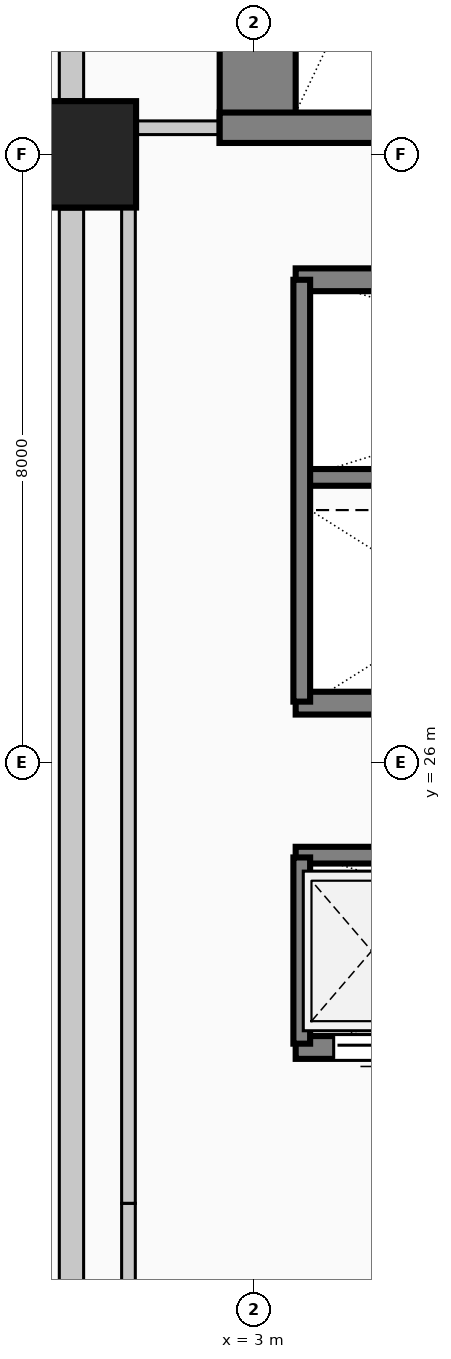
"""IFC4 building model, lengths in metres.
Left out: names, types, materials, properties, quantities, classifications, styles, units other than length and angle.
Written with IfcOpenShell. Run it as: python <this file> out.ifc"""

import sys

from ifc_helpers import new_model, si_unit, direction, frame, frame_2d, origin, origin_2d, place, context, subcontext, project, spatial, rectangle, extrude, element, fill, save


model = new_model("IFC4")
c1 = context("Model", 3, precision=1e-05, world=origin(), true_north=direction((0.0, 1.0)))
c2 = subcontext(c1, "Body", "Model", "MODEL_VIEW")
j1 = project(units=[si_unit("LENGTHUNIT", "METRE"), si_unit("PLANEANGLEUNIT", "RADIAN")], contexts=[c1])
p1 = place(None, origin())
s1 = spatial("IfcSite", under=j1, at=p1, CompositionType="ELEMENT")
p2 = place(p1, origin())
s2 = spatial("IfcBuilding", under=s1, at=p2, CompositionType="ELEMENT")
p3 = place(p2, frame((0.0, 0.0, 9.45)))
s3 = spatial("IfcBuildingStorey", under=s2, at=p3, CompositionType="ELEMENT", Elevation=9.45)
p4 = place(p3, frame((3.05, 34.15, 0.0), z_axis=(0.0, 0.0, 1.0), x_axis=(0.0, 1.0, 0.0)))
e1 = element("IfcWall", 1, at=p4, inside=s3, PredefinedType="SHEAR", context=c2, shape_type="SweptSolid", body=[
    extrude(rectangle(XDim=9.28, YDim=1.0, at=frame_2d((4.64, 0.0))), origin(), (0.0, 0.0, 1.0), 4.05),
])
p5 = place(p3, frame((2.55, 34.35, 0.0), z_axis=(0.0, 0.0, 1.0), x_axis=(1.0, 0.0, 0.0)))
e2 = element("IfcWall", 2, at=p5, inside=s3, PredefinedType="SHEAR", context=c2, shape_type="SweptSolid", body=[
    extrude(rectangle(XDim=5.16, YDim=0.4, at=frame_2d((2.58, 0.0))), origin(), (0.0, 0.0, 1.0), 4.05),
])
p6 = place(p5, frame((2.4, 0.0, 0.0)))
e3 = element("IfcOpeningElement", 3, at=p6, cuts=e2, PredefinedType="OPENING", context=c2, shape_type="SweptSolid", body=[
    extrude(rectangle(XDim=1.15, YDim=2.2, at=frame_2d((0.575, 1.1))), frame((0.0, 0.21, 0.0), z_axis=(0.0, -1.0, 0.0), x_axis=(1.0, 0.0, 0.0)), (0.0, 0.0, 1.0), 0.42),
])
p7 = place(p3, frame((0.6, 34.0, 0.0), z_axis=(0.0, 0.0, 1.0), x_axis=(0.0, 1.0, 0.0)))
e4 = element("IfcColumn", 4, at=p7, inside=s3, PredefinedType="COLUMN", context=c2, shape_type="SweptSolid", body=[
    extrude(rectangle(XDim=1.4, YDim=1.7, at=origin_2d()), origin(), (0.0, 0.0, 1.0), 4.05),
])
p8 = place(p3, frame((0.6, 18.72, 0.0), z_axis=(0.0, 0.0, 1.0), x_axis=(0.0, 1.0, 0.0)))
e5 = element("IfcWall", 5, at=p8, inside=s3, PredefinedType="SOLIDWALL", context=c2, shape_type="SweptSolid", body=[
    extrude(rectangle(XDim=14.56, YDim=0.32, at=frame_2d((7.28, 0.0))), origin(), (0.0, 0.0, 1.0), 2.7),
])
p9 = place(p3, frame((0.6, 34.72, 0.0), z_axis=(0.0, 0.0, 1.0), x_axis=(0.0, 1.0, 0.0)))
e6 = element("IfcWall", 6, at=p9, inside=s3, PredefinedType="SOLIDWALL", context=c2, shape_type="SweptSolid", body=[
    extrude(rectangle(XDim=6.96, YDim=0.32, at=frame_2d((3.48, 0.0))), origin(), (0.0, 0.0, 1.0), 2.7),
])
p10 = place(p3, frame((5.65, 22.25, 0.0), z_axis=(0.0, 0.0, 1.0), x_axis=(-1.0, 0.0, 0.0)))
e7 = element("IfcWall", 7, at=p10, inside=s3, PredefinedType="SOLIDWALL", context=c2, shape_type="SweptSolid", body=[
    extrude(rectangle(XDim=2.1, YDim=0.3, at=frame_2d((1.05, 0.0))), origin(), (0.0, 0.0, 1.0), 4.05),
])
p11 = place(p10, frame((0.5, 0.0, 0.0)))
e8 = element("IfcOpeningElement", 8, at=p11, cuts=e7, PredefinedType="OPENING", context=c2, shape_type="SweptSolid", body=[
    extrude(rectangle(XDim=1.1, YDim=2.2, at=frame_2d((0.55, 1.1))), frame((0.0, 0.16, 0.0), z_axis=(0.0, -1.0, 0.0), x_axis=(1.0, 0.0, 0.0)), (0.0, 0.0, 1.0), 0.32),
])
for number, where, z_axis, x_axis in (
    (9, (3.55, 32.35, 0.0), (0.0, 0.0, 1.0), (1.0, 0.0, 0.0)),
    (10, (5.65, 26.78, 0.0), (0.0, 0.0, 1.0), (-1.0, 0.0, 0.0)),
):
    element("IfcWall", number, at=place(p3, frame(where, z_axis=z_axis, x_axis=x_axis)), inside=s3, PredefinedType="SOLIDWALL", context=c2, shape_type="SweptSolid", body=[
        extrude(rectangle(XDim=2.1, YDim=0.3, at=frame_2d((1.05, 0.0))), origin(), (0.0, 0.0, 1.0), 4.05),
    ])
p12 = place(p3, frame((3.55, 29.75, 0.0), z_axis=(0.0, 0.0, 1.0), x_axis=(1.0, 0.0, 0.0)))
e11 = element("IfcWall", 11, at=p12, inside=s3, PredefinedType="SOLIDWALL", context=c2, shape_type="SweptSolid", body=[
    extrude(rectangle(XDim=8.65, YDim=0.22, at=frame_2d((4.325, 0.0))), origin(), (0.0, 0.0, 1.0), 4.05),
])
p13 = place(p3, frame((3.63, 26.8, 0.0), z_axis=(0.0, 0.0, 1.0), x_axis=(0.0, 1.0, 0.0)))
e12 = element("IfcWall", 12, at=p13, inside=s3, PredefinedType="SOLIDWALL", context=c2, shape_type="SweptSolid", body=[
    extrude(rectangle(XDim=5.55, YDim=0.22, at=frame_2d((2.775, 0.0))), origin(), (0.0, 0.0, 1.0), 4.05),
])
p14 = place(p3, frame((3.55, 24.78, 0.0), z_axis=(0.0, 0.0, 1.0), x_axis=(1.0, 0.0, 0.0)))
e13 = element("IfcWall", 13, at=p14, inside=s3, PredefinedType="SOLIDWALL", context=c2, shape_type="SweptSolid", body=[
    extrude(rectangle(XDim=8.65, YDim=0.22, at=frame_2d((4.325, 0.0))), origin(), (0.0, 0.0, 1.0), 4.05),
])
p15 = place(p3, frame((3.63, 22.3, 0.0), z_axis=(0.0, 0.0, 1.0), x_axis=(0.0, 1.0, 0.0)))
e14 = element("IfcWall", 14, at=p15, inside=s3, PredefinedType="SOLIDWALL", context=c2, shape_type="SweptSolid", body=[
    extrude(rectangle(XDim=2.45, YDim=0.22, at=frame_2d((1.225, 0.0))), origin(), (0.0, 0.0, 1.0), 4.05),
])
p16 = place(p3, frame((1.45, 34.35, 0.0), z_axis=(0.0, 0.0, 1.0), x_axis=(1.0, 0.0, 0.0)))
e15 = element("IfcWall", 15, at=p16, inside=s3, PredefinedType="PARTITIONING", context=c2, shape_type="SweptSolid", body=[
    extrude(rectangle(XDim=1.1, YDim=0.18, at=frame_2d((0.55, 0.0))), origin(), (0.0, 0.0, 1.0), 2.695),
])
p17 = place(p3, frame((1.35, 19.09, 0.0), z_axis=(0.0, 0.0, 1.0), x_axis=(0.0, 1.0, 0.0)))
e16 = element("IfcWall", 16, at=p17, inside=s3, PredefinedType="PARTITIONING", context=c2, shape_type="SweptSolid", body=[
    extrude(rectangle(XDim=1.11, YDim=0.18, at=frame_2d((0.555, 0.0))), origin(), (0.0, 0.0, 1.0), 3.65),
])
p18 = place(p3, frame((1.35, 20.2, 0.0), z_axis=(0.0, 0.0, 1.0), x_axis=(0.0, 1.0, 0.0)))
e17 = element("IfcWall", 17, at=p18, inside=s3, PredefinedType="PARTITIONING", context=c2, shape_type="SweptSolid", body=[
    extrude(rectangle(XDim=13.1, YDim=0.18, at=frame_2d((6.55, 0.0))), origin(), (0.0, 0.0, 1.0), 3.65),
])
p19 = place(p11, origin())
e18 = element("IfcDoor", 18, at=p19, inside=s3, OperationType="SLIDING_TO_LEFT", PredefinedType="DOOR", context=c2, shape_type="SweptSolid", body=[
    extrude(rectangle(XDim=1.1, YDim=2.2, at=frame_2d((0.55, 1.1))), frame((0.0, 0.025, 0.0), z_axis=(0.0, -1.0, 0.0), x_axis=(1.0, 0.0, 0.0)), (0.0, 0.0, 1.0), 0.05),
])
fill(e8, e18)
save(model, sys.argv[1])
